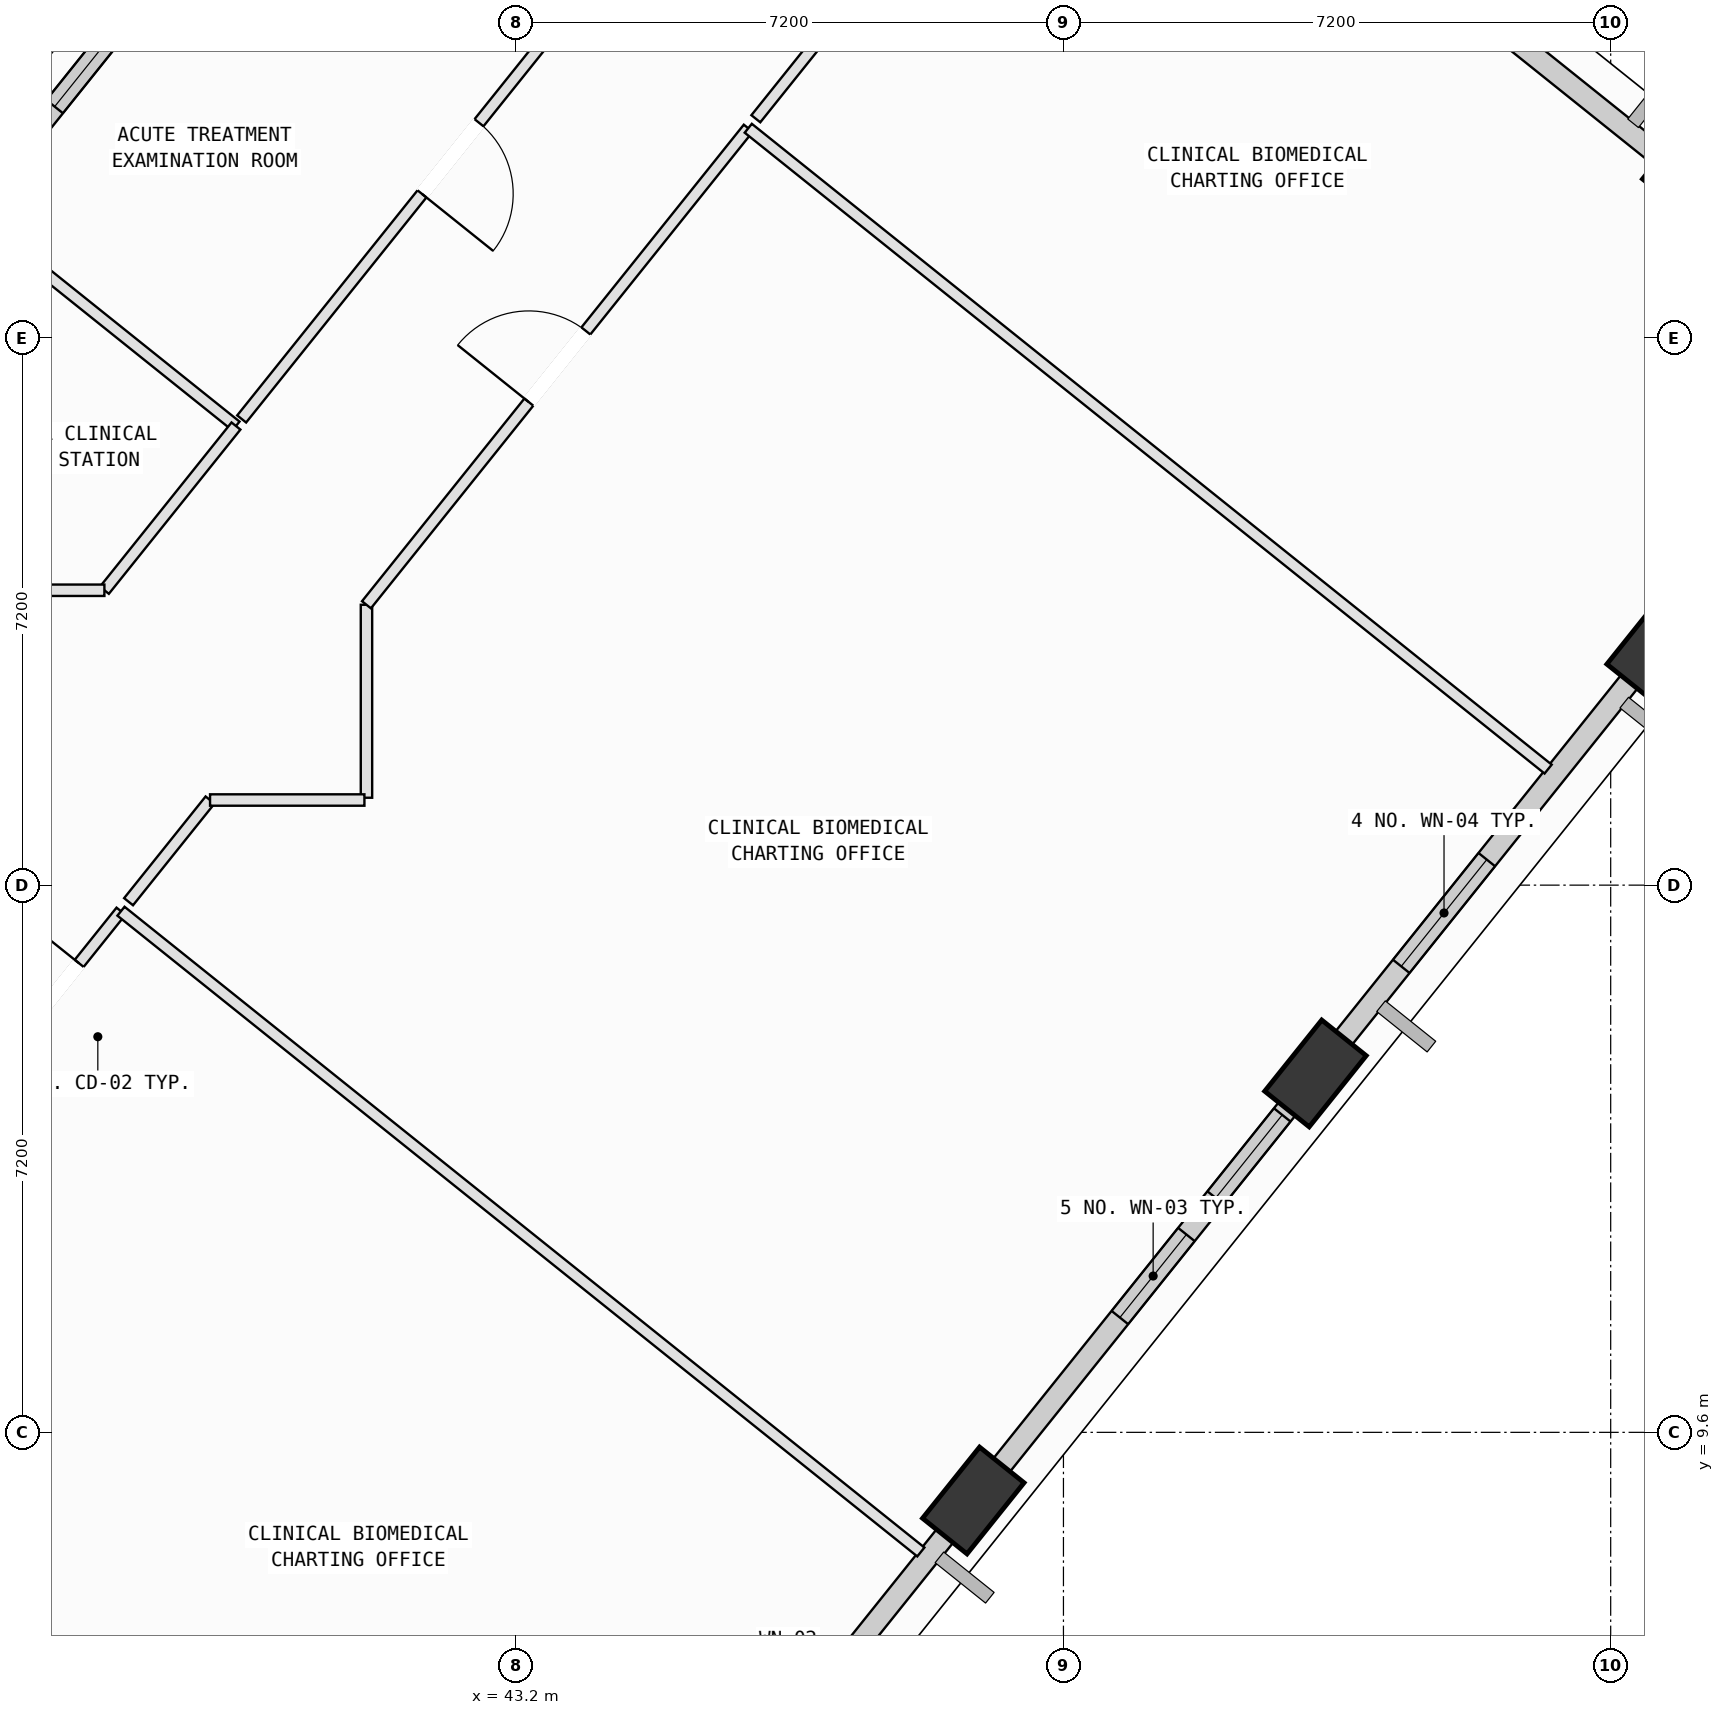
"""IFC4 building model, lengths in metres.
Left out: names, types, materials, properties, quantities, classifications, styles, units other than length and angle.
Written with IfcOpenShell. Run it as: python <this file> out.ifc"""

import sys

from ifc_helpers import new_model, si_unit, direction, frame, frame_2d, origin, origin_2d, place, context, subcontext, project, spatial, rectangle, extrude, element, fill, save


model = new_model("IFC4")
c1 = context("Model", 3, precision=1e-05, world=origin(), true_north=direction((0.0, 1.0)))
c2 = subcontext(c1, "Body", "Model", "MODEL_VIEW")
j1 = project(units=[si_unit("LENGTHUNIT", "METRE"), si_unit("PLANEANGLEUNIT", "RADIAN")], contexts=[c1])
p1 = place(None, origin())
s1 = spatial("IfcSite", under=j1, at=p1, CompositionType="ELEMENT")
p2 = place(p1, origin())
s2 = spatial("IfcBuilding", under=s1, at=p2, CompositionType="ELEMENT")
p3 = place(p2, frame((0.0, 0.0, 243.2)))
s3 = spatial("IfcBuildingStorey", under=s2, at=p3, CompositionType="ELEMENT", Elevation=243.2)
p4 = place(p3, frame((49.214, 8.703, 0.002), z_axis=(0.065877853379, 0.064965417737, 0.995710601999), x_axis=(-0.992318458895, -0.100449894077, 0.072207305141)))
e1 = element("IfcColumn", 1, at=p4, inside=s3, PredefinedType="COLUMN", context=c2, shape_type="SweptSolid", body=[
    extrude(rectangle(XDim=1.2, YDim=0.75, at=origin_2d()), origin(), (0.0, 0.0, 1.0), 4.014),
])
p5 = place(p3, frame((53.716, 14.323, 0.002), z_axis=(0.042515411902, 0.0833277744, 0.995614846095), x_axis=(-0.91007427628, -0.407964187459, 0.073007077765)))
e2 = element("IfcColumn", 2, at=p5, inside=s3, PredefinedType="COLUMN", context=c2, shape_type="SweptSolid", body=[
    extrude(rectangle(XDim=1.2, YDim=0.75, at=origin_2d()), origin(), (0.0, 0.0, 1.0), 4.014),
])
p6 = place(p3, frame((58.218, 19.941, 0.002), z_axis=(0.019140338397, 0.10171722691, 0.994629203872), x_axis=(-0.758005842311, -0.647226631841, 0.080776420186)))
e3 = element("IfcColumn", 3, at=p6, inside=s3, PredefinedType="COLUMN", context=c2, shape_type="SweptSolid", body=[
    extrude(rectangle(XDim=1.2, YDim=0.75, at=origin_2d()), origin(), (0.0, 0.0, 1.0), 4.018),
])
p7 = place(p3, frame((58.721, 26.009, 0.002), z_axis=(-0.005833123973, 0.103537950515, 0.994608399054), x_axis=(0.81417436665, -0.576988739135, 0.064838997537)))
e4 = element("IfcColumn", 4, at=p7, inside=s3, PredefinedType="COLUMN", context=c2, shape_type="SweptSolid", body=[
    extrude(rectangle(XDim=1.2, YDim=0.75, at=origin_2d()), origin(), (0.0, 0.0, 1.0), 4.018),
])
p8 = place(p3, frame((49.081, 8.538, 0.0), z_axis=(0.0, 0.0, 1.0), x_axis=(-0.625214850617, -0.780452683107, 0.0)))
e5 = element("IfcWall", 5, at=p8, inside=s3, PredefinedType="SOLIDWALL", context=c2, shape_type="SweptSolid", body=[
    extrude(rectangle(XDim=6.413, YDim=0.28, at=frame_2d((3.207, 0.0))), origin(), (0.0, 0.0, 1.0), 3.265),
])
p9 = place(p8, frame((2.683, 0.0, 0.75)))
e6 = element("IfcOpeningElement", 6, at=p9, cuts=e5, PredefinedType="OPENING", context=c2, shape_type="SweptSolid", body=[
    extrude(rectangle(XDim=2.0, YDim=1.95, at=frame_2d((1.0, 0.975))), frame((0.0, 0.15, 0.0), z_axis=(0.0, -1.0, 0.0), x_axis=(1.0, 0.0, 0.0)), (0.0, 0.0, 1.0), 0.3),
])
p10 = place(p3, frame((53.583, 14.157, 0.0), z_axis=(0.0, 0.0, 1.0), x_axis=(-0.625275753654, -0.780403890234, 0.0)))
e7 = element("IfcWall", 7, at=p10, inside=s3, PredefinedType="SOLIDWALL", context=c2, shape_type="SweptSolid", body=[
    extrude(rectangle(XDim=6.407, YDim=0.28, at=frame_2d((3.204, 0.0))), origin(), (0.0, 0.0, 1.0), 3.265),
])
p11 = place(p10, frame((2.504, 0.0, 0.75)))
e8 = element("IfcOpeningElement", 8, at=p11, cuts=e7, PredefinedType="OPENING", context=c2, shape_type="SweptSolid", body=[
    extrude(rectangle(XDim=1.4, YDim=1.85, at=frame_2d((0.7, 0.925))), frame((0.0, 0.15, 0.0), z_axis=(0.0, -1.0, 0.0), x_axis=(1.0, 0.0, 0.0)), (0.0, 0.0, 1.0), 0.3),
])
p12 = place(p10, frame((0.487, 0.0, 0.75)))
e9 = element("IfcOpeningElement", 9, at=p12, cuts=e7, PredefinedType="OPENING", context=c2, shape_type="SweptSolid", body=[
    extrude(rectangle(XDim=1.4, YDim=1.85, at=frame_2d((0.7, 0.925))), frame((0.0, 0.15, 0.0), z_axis=(0.0, -1.0, 0.0), x_axis=(1.0, 0.0, 0.0)), (0.0, 0.0, 1.0), 0.3),
])
p13 = place(p3, frame((58.091, 19.784, 0.0), z_axis=(0.0, 0.0, 1.0), x_axis=(-0.625260807623, -0.780415865069, 0.0)))
e10 = element("IfcWall", 10, at=p13, inside=s3, PredefinedType="SOLIDWALL", context=c2, shape_type="SweptSolid", body=[
    extrude(rectangle(XDim=6.418, YDim=0.28, at=frame_2d((3.209, 0.0))), origin(), (0.0, 0.0, 1.0), 3.265),
])
p14 = place(p13, frame((3.393, 0.0, 0.75)))
e11 = element("IfcOpeningElement", 11, at=p14, cuts=e10, PredefinedType="OPENING", context=c2, shape_type="SweptSolid", body=[
    extrude(rectangle(XDim=1.8, YDim=2.05, at=frame_2d((0.9, 1.025))), frame((0.0, 0.15, 0.0), z_axis=(0.0, -1.0, 0.0), x_axis=(1.0, 0.0, 0.0)), (0.0, 0.0, 1.0), 0.3),
])
p15 = place(p3, frame((52.828, 30.73, 0.0), z_axis=(0.0, 0.0, 1.0), x_axis=(0.780415642575, -0.625261085327, 0.0)))
e12 = element("IfcWall", 12, at=p15, inside=s3, PredefinedType="SOLIDWALL", context=c2, shape_type="SweptSolid", body=[
    extrude(rectangle(XDim=7.046, YDim=0.28, at=frame_2d((3.523, 0.0))), origin(), (0.0, 0.0, 1.0), 3.265),
])
p16 = place(p3, frame((35.159, 24.587, 0.0), z_axis=(0.0, 0.0, 1.0), x_axis=(0.625266247594, 0.780411506591, 0.0)))
e13 = element("IfcWall", 13, at=p16, inside=s3, PredefinedType="SOLIDWALL", context=c2, shape_type="SweptSolid", body=[
    extrude(rectangle(XDim=6.409, YDim=0.28, at=frame_2d((3.205, 0.0))), origin(), (0.0, 0.0, 1.0), 3.265),
])
p17 = place(p16, frame((3.148, 0.0, 0.75)))
e14 = element("IfcOpeningElement", 14, at=p17, cuts=e13, PredefinedType="OPENING", context=c2, shape_type="SweptSolid", body=[
    extrude(rectangle(XDim=1.8, YDim=2.05, at=frame_2d((0.9, 1.025))), frame((0.0, 0.15, 0.0), z_axis=(0.0, -1.0, 0.0), x_axis=(1.0, 0.0, 0.0)), (0.0, 0.0, 1.0), 0.3),
])
p18 = place(p3, frame((31.689, 7.675, 0.0), z_axis=(0.0, 0.0, 1.0), x_axis=(0.78039660669, -0.625284844105, 0.0)))
e15 = element("IfcWall", 15, at=p18, inside=s3, PredefinedType="PARTITIONING", context=c2, shape_type="SweptSolid", body=[
    extrude(rectangle(XDim=12.919, YDim=0.15, at=frame_2d((6.459, 0.0))), origin(), (0.0, 0.0, 1.0), 3.78),
])
p19 = place(p18, frame((6.29, 0.0, 0.0)))
e16 = element("IfcOpeningElement", 16, at=p19, cuts=e15, PredefinedType="OPENING", context=c2, shape_type="SweptSolid", body=[
    extrude(rectangle(XDim=0.86, YDim=2.06, at=frame_2d((0.43, 1.03))), frame((0.0, 0.085, 0.0), z_axis=(0.0, -1.0, 0.0), x_axis=(1.0, 0.0, 0.0)), (0.0, 0.0, 1.0), 0.17),
])
p20 = place(p3, frame((36.15, 14.148, 0.0), z_axis=(0.0, 0.0, 1.0), x_axis=(0.625278496927, 0.780401692259, 0.0)))
e17 = element("IfcWall", 17, at=p20, inside=s3, PredefinedType="PARTITIONING", context=c2, shape_type="SweptSolid", body=[
    extrude(rectangle(XDim=2.959, YDim=0.15, at=frame_2d((1.479, 0.0))), origin(), (0.0, 0.0, 1.0), 3.78),
])
p21 = place(p20, frame((0.879, 0.0, 0.0)))
e18 = element("IfcOpeningElement", 18, at=p21, cuts=e17, PredefinedType="OPENING", context=c2, shape_type="SweptSolid", body=[
    extrude(rectangle(XDim=1.2, YDim=2.15, at=frame_2d((0.6, 1.075))), frame((0.0, 0.085, 0.0), z_axis=(0.0, -1.0, 0.0), x_axis=(1.0, 0.0, 0.0)), (0.0, 0.0, 1.0), 0.17),
])
p22 = place(p3, frame((38.0, 16.457, 0.0), z_axis=(0.0, 0.0, 1.0), x_axis=(0.78043410056, -0.625238046414, 0.0)))
e19 = element("IfcWall", 19, at=p22, inside=s3, PredefinedType="PARTITIONING", context=c2, shape_type="SweptSolid", body=[
    extrude(rectangle(XDim=13.485, YDim=0.15, at=frame_2d((6.742, 0.0))), origin(), (0.0, 0.0, 1.0), 3.78),
])
p23 = place(p3, frame((41.23, 17.95, 0.0), z_axis=(0.0, 0.0, 1.0), x_axis=(0.0, 1.0, 0.0)))
e20 = element("IfcWall", 20, at=p23, inside=s3, PredefinedType="PARTITIONING", context=c2, shape_type="SweptSolid", body=[
    extrude(rectangle(XDim=2.539, YDim=0.15, at=frame_2d((1.27, 0.0))), origin(), (0.0, 0.0, 1.0), 3.78),
])
p24 = place(p3, frame((41.23, 20.489, 0.0), z_axis=(0.0, 0.0, 1.0), x_axis=(0.625221152435, 0.780447634725, 0.0)))
e21 = element("IfcWall", 21, at=p24, inside=s3, PredefinedType="PARTITIONING", context=c2, shape_type="SweptSolid", body=[
    extrude(rectangle(XDim=8.034, YDim=0.15, at=frame_2d((4.017, 0.0))), origin(), (0.0, 0.0, 1.0), 3.78),
])
p25 = place(p24, frame((3.417, 0.0, 0.0)))
e22 = element("IfcOpeningElement", 22, at=p25, cuts=e21, PredefinedType="OPENING", context=c2, shape_type="SweptSolid", body=[
    extrude(rectangle(XDim=1.2, YDim=2.15, at=frame_2d((0.6, 1.075))), frame((0.0, 0.085, 0.0), z_axis=(0.0, -1.0, 0.0), x_axis=(1.0, 0.0, 0.0)), (0.0, 0.0, 1.0), 0.17),
])
p26 = place(p3, frame((46.253, 26.759, 0.0), z_axis=(0.0, 0.0, 1.0), x_axis=(0.780405841244, -0.6252733186, 0.0)))
e23 = element("IfcWall", 23, at=p26, inside=s3, PredefinedType="PARTITIONING", context=c2, shape_type="SweptSolid", body=[
    extrude(rectangle(XDim=13.486, YDim=0.15, at=frame_2d((6.743, 0.0))), origin(), (0.0, 0.0, 1.0), 3.78),
])
p27 = place(p3, frame((54.257, 14.631, 0.0), z_axis=(0.0, 0.0, 1.0), x_axis=(-0.624996262156, -0.780627742456, 0.0)))
e24 = element("IfcWall", 24, at=p27, inside=s3, PredefinedType="PARTITIONING", context=c2, shape_type="SweptSolid", body=[
    extrude(rectangle(XDim=0.791, YDim=0.15, at=frame_2d((0.395, 0.0))), origin(), (0.0, 0.0, 1.0), 3.265),
])
p28 = place(p3, frame((49.757, 9.013, 0.0), z_axis=(0.0, 0.0, 1.0), x_axis=(-0.625445485624, -0.780267867154, 0.0)))
e25 = element("IfcWall", 25, at=p28, inside=s3, PredefinedType="PARTITIONING", context=c2, shape_type="SweptSolid", body=[
    extrude(rectangle(XDim=0.793, YDim=0.15, at=frame_2d((0.396, 0.0))), origin(), (0.0, 0.0, 1.0), 3.265),
])
p29 = place(p3, frame((38.1, 16.582, 0.0), z_axis=(0.0, 0.0, 1.0), x_axis=(0.625302686787, 0.780382310087, 0.0)))
e26 = element("IfcWall", 26, at=p29, inside=s3, PredefinedType="PARTITIONING", context=c2, shape_type="SweptSolid", body=[
    extrude(rectangle(XDim=1.714, YDim=0.15, at=frame_2d((0.857, 0.0))), origin(), (0.0, 0.0, 1.0), 3.78),
])
p30 = place(p3, frame((39.172, 17.92, 0.0), z_axis=(0.0, 0.0, 1.0), x_axis=(1.0, 0.0, 0.0)))
e27 = element("IfcWall", 27, at=p30, inside=s3, PredefinedType="PARTITIONING", context=c2, shape_type="SweptSolid", body=[
    extrude(rectangle(XDim=2.031, YDim=0.15, at=frame_2d((1.015, 0.0))), origin(), (0.0, 0.0, 1.0), 3.78),
])
p31 = place(p3, frame((46.353, 26.884, 0.0), z_axis=(0.0, 0.0, 1.0), x_axis=(0.625284721196, 0.780396705169, 0.0)))
e28 = element("IfcWall", 28, at=p31, inside=s3, PredefinedType="PARTITIONING", context=c2, shape_type="SweptSolid", body=[
    extrude(rectangle(XDim=6.562, YDim=0.15, at=frame_2d((3.281, 0.0))), origin(), (0.0, 0.0, 1.0), 3.78),
])
p32 = place(p31, frame((2.681, 0.0, 0.0)))
e29 = element("IfcOpeningElement", 29, at=p32, cuts=e28, PredefinedType="OPENING", context=c2, shape_type="SweptSolid", body=[
    extrude(rectangle(XDim=1.2, YDim=2.15, at=frame_2d((0.6, 1.075))), frame((0.0, 0.085, 0.0), z_axis=(0.0, -1.0, 0.0), x_axis=(1.0, 0.0, 0.0)), (0.0, 0.0, 1.0), 0.17),
])
p33 = place(p3, frame((36.099, 25.576, 0.0), z_axis=(0.0, 0.0, 1.0), x_axis=(0.780443899809, -0.625225814607, 0.0)))
e30 = element("IfcWall", 30, at=p33, inside=s3, PredefinedType="PARTITIONING", context=c2, shape_type="SweptSolid", body=[
    extrude(rectangle(XDim=4.374, YDim=0.15, at=frame_2d((2.187, 0.0))), origin(), (0.0, 0.0, 1.0), 3.78),
])
p34 = place(p3, frame((39.513, 22.841, 0.0), z_axis=(0.0, 0.0, 1.0), x_axis=(-0.625146560875, -0.780507384607, 0.0)))
e31 = element("IfcWall", 31, at=p34, inside=s3, PredefinedType="PARTITIONING", context=c2, shape_type="SweptSolid", body=[
    extrude(rectangle(XDim=2.769, YDim=0.15, at=frame_2d((1.384, 0.0))), origin(), (0.0, 0.0, 1.0), 3.78),
])
p35 = place(p3, frame((37.782, 20.68, 0.0), z_axis=(0.0, 0.0, 1.0), x_axis=(-1.0, 0.0, 0.0)))
e32 = element("IfcWall", 32, at=p35, inside=s3, PredefinedType="PARTITIONING", context=c2, shape_type="SweptSolid", body=[
    extrude(rectangle(XDim=5.606, YDim=0.15, at=frame_2d((2.803, 0.0))), origin(), (0.0, 0.0, 1.0), 3.415),
])
p36 = place(p35, frame((2.203, 0.0, 0.0)))
e33 = element("IfcOpeningElement", 33, at=p36, cuts=e32, PredefinedType="OPENING", context=c2, shape_type="SweptSolid", body=[
    extrude(rectangle(XDim=1.2, YDim=2.15, at=frame_2d((0.6, 1.075))), frame((0.0, 0.085, 0.0), z_axis=(0.0, -1.0, 0.0), x_axis=(1.0, 0.0, 0.0)), (0.0, 0.0, 1.0), 0.17),
])
p37 = place(p3, frame((45.083, 29.793, 0.0), z_axis=(0.0, 0.0, 1.0), x_axis=(-0.625250470094, -0.780424147273, 0.0)))
e34 = element("IfcWall", 34, at=p37, inside=s3, PredefinedType="PARTITIONING", context=c2, shape_type="SweptSolid", body=[
    extrude(rectangle(XDim=8.789, YDim=0.15, at=frame_2d((4.394, 0.0))), origin(), (0.0, 0.0, 1.0), 3.78),
])
p38 = place(p37, frame((3.794, 0.0, 0.0)))
e35 = element("IfcOpeningElement", 35, at=p38, cuts=e34, PredefinedType="OPENING", context=c2, shape_type="SweptSolid", body=[
    extrude(rectangle(XDim=1.2, YDim=2.15, at=frame_2d((0.6, 1.075))), frame((0.0, 0.085, 0.0), z_axis=(0.0, -1.0, 0.0), x_axis=(1.0, 0.0, 0.0)), (0.0, 0.0, 1.0), 0.17),
])
p39 = place(p3, frame((35.655, 26.085, 0.0), z_axis=(0.0, 0.0, 1.0), x_axis=(0.625219995527, 0.780448561529, 0.0)))
e36 = element("IfcWall", 36, at=p39, inside=s3, PredefinedType="PARTITIONING", context=c2, shape_type="SweptSolid", body=[
    extrude(rectangle(XDim=8.789, YDim=0.15, at=frame_2d((4.395, 0.0))), origin(), (0.0, 0.0, 1.0), 3.265),
])
p40 = place(p11, origin())
e37 = element("IfcWindow", 37, at=p40, inside=s3, PartitioningType="SINGLE_PANEL", PredefinedType="WINDOW", context=c2, shape_type="SweptSolid", body=[
    extrude(rectangle(XDim=1.4, YDim=1.85, at=frame_2d((0.7, 0.925))), frame((0.0, 0.03, 0.0), z_axis=(0.0, -1.0, 0.0), x_axis=(1.0, 0.0, 0.0)), (0.0, 0.0, 1.0), 0.06),
])
fill(e8, e37)
p41 = place(p12, origin())
e38 = element("IfcWindow", 38, at=p41, inside=s3, PartitioningType="SINGLE_PANEL", PredefinedType="WINDOW", context=c2, shape_type="SweptSolid", body=[
    extrude(rectangle(XDim=1.4, YDim=1.85, at=frame_2d((0.7, 0.925))), frame((0.0, 0.03, 0.0), z_axis=(0.0, -1.0, 0.0), x_axis=(1.0, 0.0, 0.0)), (0.0, 0.0, 1.0), 0.06),
])
fill(e9, e38)
p42 = place(p14, origin())
e39 = element("IfcWindow", 39, at=p42, inside=s3, PartitioningType="SINGLE_PANEL", PredefinedType="WINDOW", context=c2, shape_type="SweptSolid", body=[
    extrude(rectangle(XDim=1.8, YDim=2.05, at=frame_2d((0.9, 1.025))), frame((0.0, 0.03, 0.0), z_axis=(0.0, -1.0, 0.0), x_axis=(1.0, 0.0, 0.0)), (0.0, 0.0, 1.0), 0.06),
])
fill(e11, e39)
p43 = place(p17, origin())
e40 = element("IfcWindow", 40, at=p43, inside=s3, PartitioningType="SINGLE_PANEL", PredefinedType="WINDOW", context=c2, shape_type="SweptSolid", body=[
    extrude(rectangle(XDim=1.8, YDim=2.05, at=frame_2d((0.9, 1.025))), frame((0.0, 0.03, 0.0), z_axis=(0.0, -1.0, 0.0), x_axis=(1.0, 0.0, 0.0)), (0.0, 0.0, 1.0), 0.06),
])
fill(e14, e40)
p44 = place(p21, origin())
e41 = element("IfcDoor", 41, at=p44, inside=s3, OperationType="SINGLE_SWING_RIGHT", PredefinedType="DOOR", context=c2, shape_type="SweptSolid", body=[
    extrude(rectangle(XDim=1.2, YDim=2.15, at=frame_2d((0.6, 1.075))), frame((0.0, 0.025, 0.0), z_axis=(0.0, -1.0, 0.0), x_axis=(1.0, 0.0, 0.0)), (0.0, 0.0, 1.0), 0.05),
])
fill(e18, e41)
p45 = place(p25, origin())
e42 = element("IfcDoor", 42, at=p45, inside=s3, OperationType="SINGLE_SWING_LEFT", PredefinedType="DOOR", context=c2, shape_type="SweptSolid", body=[
    extrude(rectangle(XDim=1.2, YDim=2.15, at=frame_2d((0.6, 1.075))), frame((0.0, 0.025, 0.0), z_axis=(0.0, -1.0, 0.0), x_axis=(1.0, 0.0, 0.0)), (0.0, 0.0, 1.0), 0.05),
])
fill(e22, e42)
p46 = place(p38, origin())
e43 = element("IfcDoor", 43, at=p46, inside=s3, OperationType="SINGLE_SWING_RIGHT", PredefinedType="DOOR", context=c2, shape_type="SweptSolid", body=[
    extrude(rectangle(XDim=1.2, YDim=2.15, at=frame_2d((0.6, 1.075))), frame((0.0, 0.025, 0.0), z_axis=(0.0, -1.0, 0.0), x_axis=(1.0, 0.0, 0.0)), (0.0, 0.0, 1.0), 0.05),
])
fill(e35, e43)
save(model, sys.argv[1])
